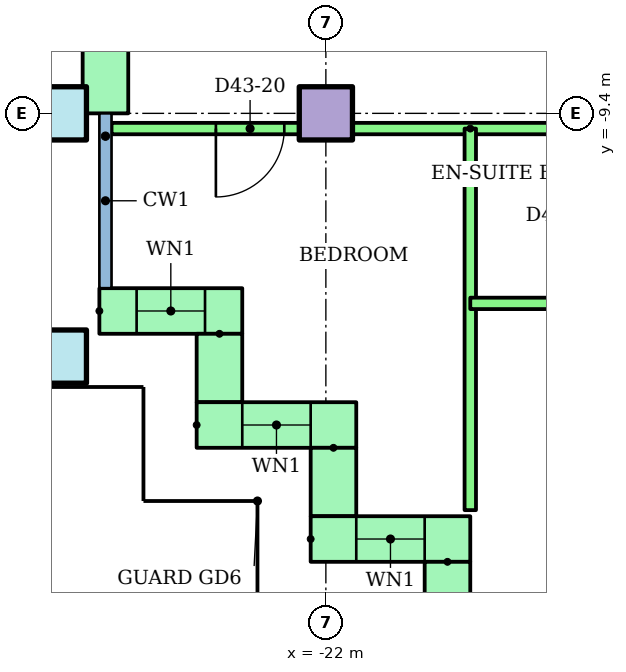
"""IFC4 building model, lengths in metres.
Left out: names, types, materials, properties, quantities, classifications, styles, units other than length and angle.
Written with IfcOpenShell. Run it as: python <this file> out.ifc"""

import sys

from ifc_helpers import new_model, si_unit, direction, frame, frame_2d, origin, origin_2d, place, context, subcontext, project, spatial, rectangle, hollow_rectangle, extrude, element, fill, save


model = new_model("IFC4")
c1 = context("Model", 3, precision=1e-05, world=origin(), true_north=direction((0.0, 1.0)))
c2 = subcontext(c1, "Body", "Model", "MODEL_VIEW")
j1 = project(units=[si_unit("LENGTHUNIT", "METRE"), si_unit("PLANEANGLEUNIT", "RADIAN")], contexts=[c1])
p1 = place(None, origin())
s1 = spatial("IfcSite", under=j1, at=p1, CompositionType="ELEMENT")
p2 = place(p1, origin())
s2 = spatial("IfcBuilding", under=s1, at=p2, CompositionType="ELEMENT")
p3 = place(p2, frame((0.0, 0.0, 168.5)))
s3 = spatial("IfcBuildingStorey", under=s2, at=p3, CompositionType="ELEMENT", Elevation=168.5)
for number, where in (
    (1, (-25.5, -12.6, 0.0)),
    (2, (-25.5, -9.4, 0.0)),
):
    element("IfcColumn", number, at=place(p3, frame(where)), inside=s3, PredefinedType="COLUMN", context=c2, shape_type="SweptSolid", body=[
        extrude(hollow_rectangle(XDim=0.7, YDim=0.7, WallThickness=0.036, at=origin_2d()), origin(), (0.0, 0.0, 1.0), 3.2),
    ])
p4 = place(p3, frame((-22.0, -9.4, 0.0)))
e3 = element("IfcColumn", 3, at=p4, inside=s3, PredefinedType="COLUMN", context=c2, shape_type="SweptSolid", body=[
    extrude(rectangle(XDim=0.7, YDim=0.7, at=origin_2d()), origin(), (0.0, 0.0, 1.0), 3.2),
])
p5 = place(p3, frame((-24.9, -5.7, 0.0), z_axis=(0.0, 0.0, 1.0), x_axis=(0.0, -1.0, 0.0)))
e4 = element("IfcWall", 4, at=p5, inside=s3, PredefinedType="STANDARD", context=c2, shape_type="SweptSolid", body=[
    extrude(rectangle(XDim=3.7, YDim=0.6, at=frame_2d((1.85, 0.0))), origin(), (0.0, 0.0, 1.0), 2.92),
])
p6 = place(p5, frame((1.025, 0.0, 0.0)))
e5 = element("IfcOpeningElement", 5, at=p6, cuts=e4, PredefinedType="OPENING", context=c2, shape_type="SweptSolid", body=[
    extrude(rectangle(XDim=1.2, YDim=2.1, at=frame_2d((0.6, 1.05))), frame((0.0, 0.31, 0.0), z_axis=(0.0, -1.0, 0.0), x_axis=(1.0, 0.0, 0.0)), (0.0, 0.0, 1.0), 0.62),
])
p7 = place(p3, frame((-24.98, -12.0, 0.0)))
e6 = element("IfcWall", 6, at=p7, inside=s3, PredefinedType="STANDARD", context=c2, shape_type="SweptSolid", body=[
    extrude(rectangle(XDim=1.88, YDim=0.6, at=frame_2d((0.94, 0.0))), origin(), (0.0, 0.0, 1.0), 2.92),
])
p8 = place(p7, frame((0.49, 0.0, 0.9)))
e7 = element("IfcOpeningElement", 7, at=p8, cuts=e6, PredefinedType="OPENING", context=c2, shape_type="SweptSolid", body=[
    extrude(rectangle(XDim=0.9, YDim=1.5, at=frame_2d((0.45, 0.75))), frame((0.0, 0.31, 0.0), z_axis=(0.0, -1.0, 0.0), x_axis=(1.0, 0.0, 0.0)), (0.0, 0.0, 1.0), 0.62),
])
p9 = place(p3, frame((-23.4, -12.3, 0.0), z_axis=(0.0, 0.0, 1.0), x_axis=(0.0, -1.0, 0.0)))
e8 = element("IfcWall", 8, at=p9, inside=s3, PredefinedType="STANDARD", context=c2, shape_type="SweptSolid", body=[
    extrude(rectangle(XDim=0.9, YDim=0.6, at=frame_2d((0.45, 0.0))), origin(), (0.0, 0.0, 1.0), 2.92),
])
p10 = place(p3, frame((-23.7, -13.5, 0.0)))
e9 = element("IfcWall", 9, at=p10, inside=s3, PredefinedType="STANDARD", context=c2, shape_type="SweptSolid", body=[
    extrude(rectangle(XDim=2.1, YDim=0.6, at=frame_2d((1.05, 0.0))), origin(), (0.0, 0.0, 1.0), 2.92),
])
p11 = place(p10, frame((0.6, 0.0, 0.9)))
e10 = element("IfcOpeningElement", 10, at=p11, cuts=e9, PredefinedType="OPENING", context=c2, shape_type="SweptSolid", body=[
    extrude(rectangle(XDim=0.9, YDim=1.5, at=frame_2d((0.45, 0.75))), frame((0.0, 0.31, 0.0), z_axis=(0.0, -1.0, 0.0), x_axis=(1.0, 0.0, 0.0)), (0.0, 0.0, 1.0), 0.62),
])
p12 = place(p3, frame((-21.9, -13.8, 0.0), z_axis=(0.0, 0.0, 1.0), x_axis=(0.0, -1.0, 0.0)))
e11 = element("IfcWall", 11, at=p12, inside=s3, PredefinedType="STANDARD", context=c2, shape_type="SweptSolid", body=[
    extrude(rectangle(XDim=0.9, YDim=0.6, at=frame_2d((0.45, 0.0))), origin(), (0.0, 0.0, 1.0), 2.92),
])
p13 = place(p3, frame((-22.2, -15.0, 0.0)))
e12 = element("IfcWall", 12, at=p13, inside=s3, PredefinedType="STANDARD", context=c2, shape_type="SweptSolid", body=[
    extrude(rectangle(XDim=2.1, YDim=0.6, at=frame_2d((1.05, 0.0))), origin(), (0.0, 0.0, 1.0), 2.92),
])
p14 = place(p13, frame((0.6, 0.0, 0.9)))
e13 = element("IfcOpeningElement", 13, at=p14, cuts=e12, PredefinedType="OPENING", context=c2, shape_type="SweptSolid", body=[
    extrude(rectangle(XDim=0.9, YDim=1.5, at=frame_2d((0.45, 0.75))), frame((0.0, 0.31, 0.0), z_axis=(0.0, -1.0, 0.0), x_axis=(1.0, 0.0, 0.0)), (0.0, 0.0, 1.0), 0.62),
])
p15 = place(p3, frame((-20.4, -15.3, 0.0), z_axis=(0.0, 0.0, 1.0), x_axis=(0.0, -1.0, 0.0)))
e14 = element("IfcWall", 14, at=p15, inside=s3, PredefinedType="STANDARD", context=c2, shape_type="SweptSolid", body=[
    extrude(rectangle(XDim=1.28, YDim=0.6, at=frame_2d((0.64, 0.0))), origin(), (0.0, 0.0, 1.0), 2.92),
])
p16 = place(p3, frame((-6.0, -9.6, 0.0), z_axis=(0.0, 0.0, 1.0), x_axis=(-1.0, 0.0, 0.0)))
e15 = element("IfcWall", 15, at=p16, inside=s3, PredefinedType="PARTITIONING", context=c2, shape_type="SweptSolid", body=[
    extrude(rectangle(XDim=18.82, YDim=0.15, at=frame_2d((9.41, 0.0))), origin(), (0.0, 0.0, 1.0), 2.4),
])
p17 = place(p16, frame((16.547, 0.0, 0.0)))
e16 = element("IfcOpeningElement", 16, at=p17, cuts=e15, PredefinedType="OPENING", context=c2, shape_type="SweptSolid", body=[
    extrude(rectangle(XDim=0.9, YDim=2.1, at=frame_2d((0.45, 1.05))), frame((0.0, 0.085, 0.0), z_axis=(0.0, -1.0, 0.0), x_axis=(1.0, 0.0, 0.0)), (0.0, 0.0, 1.0), 0.17),
])
p18 = place(p16, frame((10.45, 0.0, 0.0)))
e17 = element("IfcOpeningElement", 17, at=p18, cuts=e15, PredefinedType="OPENING", context=c2, shape_type="SweptSolid", body=[
    extrude(rectangle(XDim=0.9, YDim=2.1, at=frame_2d((0.45, 1.05))), frame((0.0, 0.085, 0.0), z_axis=(0.0, -1.0, 0.0), x_axis=(1.0, 0.0, 0.0)), (0.0, 0.0, 1.0), 0.17),
])
p19 = place(p16, frame((3.5, 0.0, 0.0)))
e18 = element("IfcOpeningElement", 18, at=p19, cuts=e15, PredefinedType="OPENING", context=c2, shape_type="SweptSolid", body=[
    extrude(rectangle(XDim=1.0, YDim=2.1, at=frame_2d((0.5, 1.05))), frame((0.0, 0.085, 0.0), z_axis=(0.0, -1.0, 0.0), x_axis=(1.0, 0.0, 0.0)), (0.0, 0.0, 1.0), 0.17),
])
p20 = place(p3, frame((-20.1, -9.6, 0.0), z_axis=(0.0, 0.0, 1.0), x_axis=(0.0, -1.0, 0.0)))
e19 = element("IfcWall", 19, at=p20, inside=s3, PredefinedType="PARTITIONING", context=c2, shape_type="SweptSolid", body=[
    extrude(rectangle(XDim=5.02, YDim=0.15, at=frame_2d((2.51, 0.0))), origin(), (0.0, 0.0, 1.0), 2.4),
])
p21 = place(p3, frame((-18.1, -11.9, 0.0), z_axis=(0.0, 0.0, 1.0), x_axis=(-1.0, 0.0, 0.0)))
e20 = element("IfcWall", 20, at=p21, inside=s3, PredefinedType="PARTITIONING", context=c2, shape_type="SweptSolid", body=[
    extrude(rectangle(XDim=2.0, YDim=0.15, at=frame_2d((1.0, 0.0))), origin(), (0.0, 0.0, 1.0), 2.4),
])
p22 = place(p8, origin())
e21 = element("IfcWindow", 21, at=p22, inside=s3, PartitioningType="SINGLE_PANEL", PredefinedType="WINDOW", context=c2, shape_type="SweptSolid", body=[
    extrude(rectangle(XDim=0.9, YDim=1.5, at=frame_2d((0.45, 0.75))), frame((0.0, 0.03, 0.0), z_axis=(0.0, -1.0, 0.0), x_axis=(1.0, 0.0, 0.0)), (0.0, 0.0, 1.0), 0.06),
])
fill(e7, e21)
p23 = place(p11, origin())
e22 = element("IfcWindow", 22, at=p23, inside=s3, PartitioningType="SINGLE_PANEL", PredefinedType="WINDOW", context=c2, shape_type="SweptSolid", body=[
    extrude(rectangle(XDim=0.9, YDim=1.5, at=frame_2d((0.45, 0.75))), frame((0.0, 0.03, 0.0), z_axis=(0.0, -1.0, 0.0), x_axis=(1.0, 0.0, 0.0)), (0.0, 0.0, 1.0), 0.06),
])
fill(e10, e22)
p24 = place(p14, origin())
e23 = element("IfcWindow", 23, at=p24, inside=s3, PartitioningType="SINGLE_PANEL", PredefinedType="WINDOW", context=c2, shape_type="SweptSolid", body=[
    extrude(rectangle(XDim=0.9, YDim=1.5, at=frame_2d((0.45, 0.75))), frame((0.0, 0.03, 0.0), z_axis=(0.0, -1.0, 0.0), x_axis=(1.0, 0.0, 0.0)), (0.0, 0.0, 1.0), 0.06),
])
fill(e13, e23)
p25 = place(p17, origin())
e24 = element("IfcDoor", 24, at=p25, inside=s3, OperationType="SINGLE_SWING_RIGHT", PredefinedType="DOOR", context=c2, shape_type="SweptSolid", body=[
    extrude(rectangle(XDim=0.9, YDim=2.1, at=frame_2d((0.45, 1.05))), frame((0.0, 0.025, 0.0), z_axis=(0.0, -1.0, 0.0), x_axis=(1.0, 0.0, 0.0)), (0.0, 0.0, 1.0), 0.05),
])
fill(e16, e24)
save(model, sys.argv[1])
